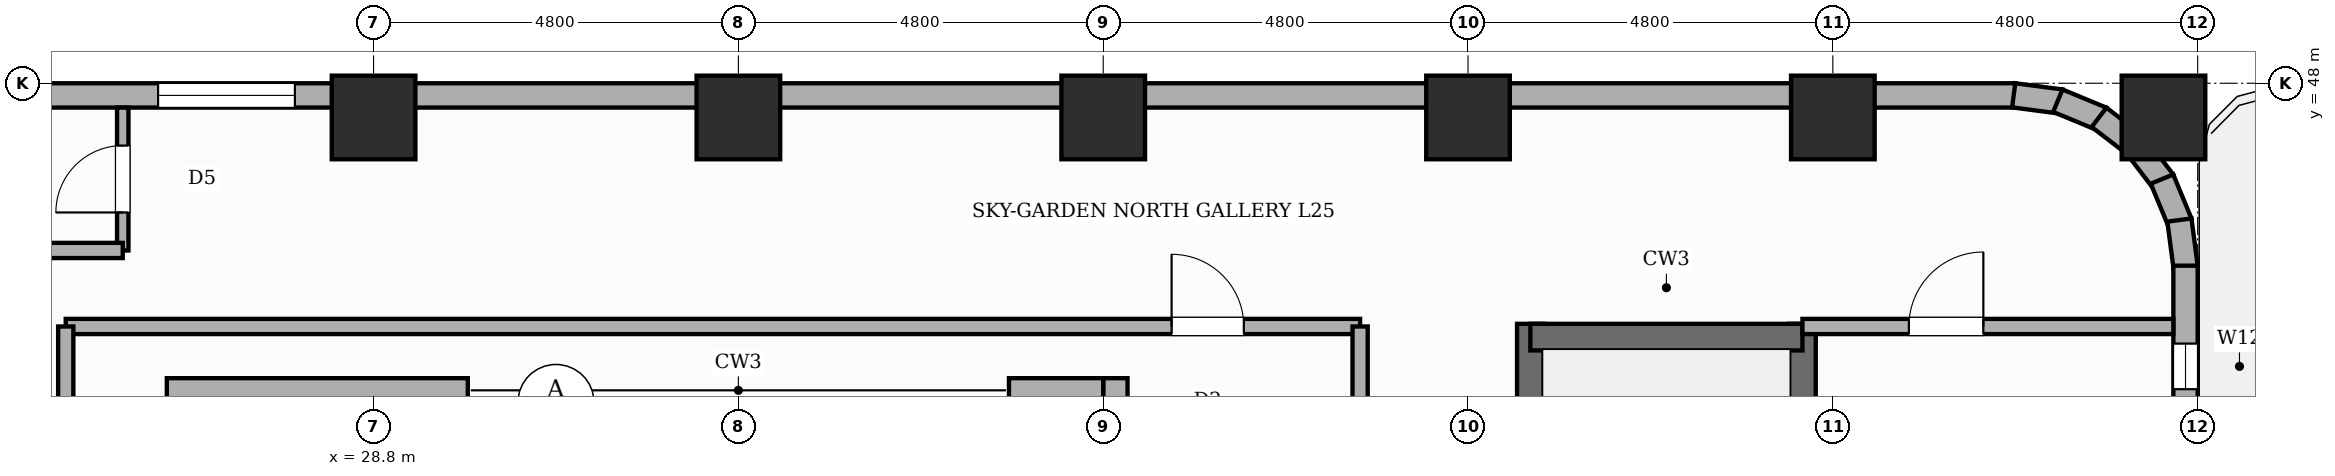
"""IFC4 building model, lengths in metres.
Left out: names, types, materials, properties, quantities, classifications, styles, units other than length and angle.
Written with IfcOpenShell. Run it as: python <this file> out.ifc"""

import sys

from ifc_helpers import new_model, si_unit, direction, frame, frame_2d, origin, origin_2d, place, context, subcontext, project, spatial, rectangle, extrude, element, fill, save


model = new_model("IFC4")
c1 = context("Model", 3, precision=1e-05, world=origin(), true_north=direction((0.0, 1.0)))
c2 = subcontext(c1, "Body", "Model", "MODEL_VIEW")
j1 = project(units=[si_unit("LENGTHUNIT", "METRE"), si_unit("PLANEANGLEUNIT", "RADIAN")], contexts=[c1])
p1 = place(None, origin())
s1 = spatial("IfcSite", under=j1, at=p1, CompositionType="ELEMENT")
p2 = place(p1, origin())
s2 = spatial("IfcBuilding", under=s1, at=p2, CompositionType="ELEMENT")
p3 = place(p2, frame((0.0, 0.0, 97.0)))
s3 = spatial("IfcBuildingStorey", under=s2, at=p3, CompositionType="ELEMENT", Elevation=97.0)
p4 = place(p3, frame((44.02, 35.865, 0.0), z_axis=(0.0, 0.0, 1.0), x_axis=(0.0, 1.0, 0.0)))
e1 = element("IfcWall", 1, at=p4, inside=s3, PredefinedType="SHEAR", context=c2, shape_type="SweptSolid", body=[
    extrude(rectangle(XDim=8.97, YDim=0.35, at=frame_2d((4.485, 0.0))), origin(), (0.0, 0.0, 1.0), 4.8),
])
p5 = place(p4, frame((0.65, 0.0, 0.0)))
e2 = element("IfcOpeningElement", 2, at=p5, cuts=e1, PredefinedType="OPENING", context=c2, shape_type="SweptSolid", body=[
    extrude(rectangle(XDim=0.95, YDim=2.1, at=frame_2d((0.475, 1.05))), frame((0.0, 0.185, 0.0), z_axis=(0.0, -1.0, 0.0), x_axis=(1.0, 0.0, 0.0)), (0.0, 0.0, 1.0), 0.37),
])
p6 = place(p3, frame((47.6, 35.865, 0.0), z_axis=(0.0, 0.0, 1.0), x_axis=(0.0, 1.0, 0.0)))
e3 = element("IfcWall", 3, at=p6, inside=s3, PredefinedType="SHEAR", context=c2, shape_type="SweptSolid", body=[
    extrude(rectangle(XDim=8.97, YDim=0.35, at=frame_2d((4.485, 0.0))), origin(), (0.0, 0.0, 1.0), 4.8),
])
p7 = place(p3, frame((44.02, 44.66, 0.0), z_axis=(0.0, 0.0, 1.0), x_axis=(1.0, 0.0, 0.0)))
e4 = element("IfcWall", 4, at=p7, inside=s3, PredefinedType="SHEAR", context=c2, shape_type="SweptSolid", body=[
    extrude(rectangle(XDim=3.58, YDim=0.35, at=frame_2d((1.79, 0.0))), origin(), (0.0, 0.0, 1.0), 4.8),
])
for number, where, z_axis, x_axis in (
    (5, (28.8, 47.55, 0.0), (0.0, 0.0, 1.0), (1.0, 0.0, 0.0)),
    (6, (33.6, 47.55, 0.0), (0.0, 0.0, 1.0), (1.0, 0.0, 0.0)),
    (7, (38.4, 47.55, 0.0), (0.0, 0.0, 1.0), (1.0, 0.0, 0.0)),
    (8, (43.2, 47.55, 0.0), (0.0, 0.0, 1.0), (1.0, 0.0, 0.0)),
    (9, (48.0, 47.55, 0.0), (0.0, 0.0, 1.0), (1.0, 0.0, 0.0)),
    (10, (52.35, 47.55, 0.0), (0.0, 0.0, 1.0), (1.0, 0.0, 0.0)),
):
    element("IfcColumn", number, at=place(p3, frame(where, z_axis=z_axis, x_axis=x_axis)), inside=s3, PredefinedType="COLUMN", context=c2, shape_type="SweptSolid", body=[
        extrude(rectangle(XDim=1.1, YDim=1.1, at=origin_2d()), origin(), (0.0, 0.0, 1.0), 4.8),
    ])
p8 = place(p3, frame((7.2, 47.84, 0.0), z_axis=(0.0, 0.0, 1.0), x_axis=(1.0, 0.0, 0.0)))
e11 = element("IfcWall", 11, at=p8, inside=s3, PredefinedType="STANDARD", context=c2, shape_type="SweptSolid", body=[
    extrude(rectangle(XDim=43.2, YDim=0.32, at=frame_2d((21.6, 0.0))), origin(), (0.0, 0.0, 1.0), 3.68),
])
p9 = place(p8, frame((18.765, 0.0, 0.8)))
e12 = element("IfcOpeningElement", 12, at=p9, cuts=e11, PredefinedType="OPENING", context=c2, shape_type="SweptSolid", body=[
    extrude(rectangle(XDim=1.8, YDim=2.1, at=frame_2d((0.9, 1.05))), frame((0.0, 0.17, 0.0), z_axis=(0.0, -1.0, 0.0), x_axis=(1.0, 0.0, 0.0)), (0.0, 0.0, 1.0), 0.34),
])
p10 = place(p8, frame((0.345, 0.0, 0.8)))
e13 = element("IfcOpeningElement", 13, at=p10, cuts=e11, PredefinedType="OPENING", context=c2, shape_type="SweptSolid", body=[
    extrude(rectangle(XDim=1.2, YDim=1.8, at=frame_2d((0.6, 0.9))), frame((0.0, 0.17, 0.0), z_axis=(0.0, -1.0, 0.0), x_axis=(1.0, 0.0, 0.0)), (0.0, 0.0, 1.0), 0.34),
])
p11 = place(p8, frame((9.685, 0.0, 0.8)))
e14 = element("IfcOpeningElement", 14, at=p11, cuts=e11, PredefinedType="OPENING", context=c2, shape_type="SweptSolid", body=[
    extrude(rectangle(XDim=1.5, YDim=2.1, at=frame_2d((0.75, 1.05))), frame((0.0, 0.17, 0.0), z_axis=(0.0, -1.0, 0.0), x_axis=(1.0, 0.0, 0.0)), (0.0, 0.0, 1.0), 0.34),
])
for number, where, z_axis, x_axis in (
    (15, (50.379, 47.841, 0.0), (0.0, 0.0, 1.0), (0.991, -0.131, 0.0)),
    (16, (50.96, 47.771, 0.0), (0.0, 0.0, 1.0), (0.924, -0.383, 0.0)),
    (17, (51.503, 47.552, 0.0), (0.0, 0.0, 1.0), (0.793, -0.609, 0.0)),
    (18, (51.97, 47.2, 0.0), (0.0, 0.0, 1.0), (0.609, -0.793, 0.0)),
    (19, (52.331, 46.739, 0.0), (0.0, 0.0, 1.0), (0.382, -0.924, 0.0)),
    (20, (52.56, 46.2, 0.0), (0.0, 0.0, 1.0), (0.131, -0.991, 0.0)),
):
    element("IfcWall", number, at=place(p3, frame(where, z_axis=z_axis, x_axis=x_axis)), inside=s3, PredefinedType="STANDARD", context=c2, shape_type="SweptSolid", body=[
        extrude(rectangle(XDim=0.626, YDim=0.32, at=frame_2d((0.313, 0.0))), origin(), (0.0, 0.0, 1.0), 3.68),
    ])
p12 = place(p3, frame((52.64, 45.6, 0.0), z_axis=(0.0, 0.0, 1.0), x_axis=(0.0, -1.0, 0.0)))
e21 = element("IfcWall", 21, at=p12, inside=s3, PredefinedType="STANDARD", context=c2, shape_type="SweptSolid", body=[
    extrude(rectangle(XDim=14.4, YDim=0.32, at=frame_2d((7.2, 0.0))), origin(), (0.0, 0.0, 1.0), 3.68),
])
p13 = place(p12, frame((8.95, 0.0, 0.0)))
e22 = element("IfcOpeningElement", 22, at=p13, cuts=e21, PredefinedType="OPENING", context=c2, shape_type="SweptSolid", body=[
    extrude(rectangle(XDim=1.3, YDim=2.2, at=frame_2d((0.65, 1.1))), frame((0.0, 0.17, 0.0), z_axis=(0.0, -1.0, 0.0), x_axis=(1.0, 0.0, 0.0)), (0.0, 0.0, 1.0), 0.34),
])
p14 = place(p12, frame((1.025, 0.0, 0.45)))
e23 = element("IfcOpeningElement", 23, at=p14, cuts=e21, PredefinedType="OPENING", context=c2, shape_type="SweptSolid", body=[
    extrude(rectangle(XDim=0.6, YDim=1.8, at=frame_2d((0.3, 0.9))), frame((0.0, 0.17, 0.0), z_axis=(0.0, -1.0, 0.0), x_axis=(1.0, 0.0, 0.0)), (0.0, 0.0, 1.0), 0.34),
])
p15 = place(p3, frame((38.56, 28.8, 0.0), z_axis=(0.0, 0.0, 1.0), x_axis=(0.0, 1.0, 0.0)))
e24 = element("IfcWall", 24, at=p15, inside=s3, PredefinedType="STANDARD", context=c2, shape_type="SweptSolid", body=[
    extrude(rectangle(XDim=15.32, YDim=0.32, at=frame_2d((7.66, 0.0))), origin(), (0.0, 0.0, 1.0), 4.5),
])
p16 = place(p15, frame((6.84, 0.0, 0.8)))
e25 = element("IfcOpeningElement", 25, at=p16, cuts=e24, PredefinedType="OPENING", context=c2, shape_type="SweptSolid", body=[
    extrude(rectangle(XDim=1.8, YDim=2.1, at=frame_2d((0.9, 1.05))), frame((0.0, 0.17, 0.0), z_axis=(0.0, -1.0, 0.0), x_axis=(1.0, 0.0, 0.0)), (0.0, 0.0, 1.0), 0.34),
])
p17 = place(p3, frame((38.4, 43.96, 0.0), z_axis=(0.0, 0.0, 1.0), x_axis=(-1.0, 0.0, 0.0)))
e26 = element("IfcWall", 26, at=p17, inside=s3, PredefinedType="STANDARD", context=c2, shape_type="SweptSolid", body=[
    extrude(rectangle(XDim=1.24, YDim=0.32, at=frame_2d((0.62, 0.0))), origin(), (0.0, 0.0, 1.0), 4.5),
])
p18 = place(p3, frame((30.04, 43.96, 0.0), z_axis=(0.0, 0.0, 1.0), x_axis=(-1.0, 0.0, 0.0)))
e27 = element("IfcWall", 27, at=p18, inside=s3, PredefinedType="STANDARD", context=c2, shape_type="SweptSolid", body=[
    extrude(rectangle(XDim=3.96, YDim=0.32, at=frame_2d((1.98, 0.0))), origin(), (0.0, 0.0, 1.0), 4.5),
])
p19 = place(p3, frame((25.5, 45.8, 0.0), z_axis=(0.0, 0.0, 1.0), x_axis=(0.0, 1.0, 0.0)))
e28 = element("IfcWall", 28, at=p19, inside=s3, PredefinedType="PARTITIONING", context=c2, shape_type="SweptSolid", body=[
    extrude(rectangle(XDim=1.88, YDim=0.15, at=frame_2d((0.94, 0.0))), origin(), (0.0, 0.0, 1.0), 4.5),
])
p20 = place(p19, frame((0.5, 0.0, 0.0)))
e29 = element("IfcOpeningElement", 29, at=p20, cuts=e28, PredefinedType="OPENING", context=c2, shape_type="SweptSolid", body=[
    extrude(rectangle(XDim=0.88, YDim=2.1, at=frame_2d((0.44, 1.05))), frame((0.0, 0.085, 0.0), z_axis=(0.0, -1.0, 0.0), x_axis=(1.0, 0.0, 0.0)), (0.0, 0.0, 1.0), 0.17),
])
p21 = place(p3, frame((22.75, 45.8, 0.0), z_axis=(0.0, 0.0, 1.0), x_axis=(1.0, 0.0, 0.0)))
e30 = element("IfcWall", 30, at=p21, inside=s3, PredefinedType="PARTITIONING", context=c2, shape_type="SweptSolid", body=[
    extrude(rectangle(XDim=2.75, YDim=0.2, at=frame_2d((1.375, 0.0))), origin(), (0.0, 0.0, 1.0), 4.5),
])
p22 = place(p3, frame((24.75, 44.8, 0.0), z_axis=(0.0, 0.0, 1.0), x_axis=(1.0, 0.0, 0.0)))
e31 = element("IfcWall", 31, at=p22, inside=s3, PredefinedType="PARTITIONING", context=c2, shape_type="SweptSolid", body=[
    extrude(rectangle(XDim=17.03, YDim=0.2, at=frame_2d((8.515, 0.0))), origin(), (0.0, 0.0, 1.0), 4.5),
])
p23 = place(p22, frame((14.55, 0.0, 0.0)))
e32 = element("IfcOpeningElement", 32, at=p23, cuts=e31, PredefinedType="OPENING", context=c2, shape_type="SweptSolid", body=[
    extrude(rectangle(XDim=0.95, YDim=2.15, at=frame_2d((0.475, 1.075))), frame((0.0, 0.11, 0.0), z_axis=(0.0, -1.0, 0.0), x_axis=(1.0, 0.0, 0.0)), (0.0, 0.0, 1.0), 0.22),
])
p24 = place(p3, frame((47.6, 44.8, 0.0), z_axis=(0.0, 0.0, 1.0), x_axis=(1.0, 0.0, 0.0)))
e33 = element("IfcWall", 33, at=p24, inside=s3, PredefinedType="PARTITIONING", context=c2, shape_type="SweptSolid", body=[
    extrude(rectangle(XDim=4.88, YDim=0.2, at=frame_2d((2.44, 0.0))), origin(), (0.0, 0.0, 1.0), 4.5),
])
p25 = place(p24, frame((1.4, 0.0, 0.0)))
e34 = element("IfcOpeningElement", 34, at=p25, cuts=e33, PredefinedType="OPENING", context=c2, shape_type="SweptSolid", body=[
    extrude(rectangle(XDim=0.98, YDim=2.18, at=frame_2d((0.49, 1.09))), frame((0.0, 0.11, 0.0), z_axis=(0.0, -1.0, 0.0), x_axis=(1.0, 0.0, 0.0)), (0.0, 0.0, 1.0), 0.22),
])
p26 = place(p3, frame((24.75, 40.6, 0.0), z_axis=(0.0, 0.0, 1.0), x_axis=(0.0, 1.0, 0.0)))
e35 = element("IfcWall", 35, at=p26, inside=s3, PredefinedType="PARTITIONING", context=c2, shape_type="SweptSolid", body=[
    extrude(rectangle(XDim=4.2, YDim=0.2, at=frame_2d((2.1, 0.0))), origin(), (0.0, 0.0, 1.0), 4.5),
])
p27 = place(p26, frame((0.85, 0.0, 0.0)))
e36 = element("IfcOpeningElement", 36, at=p27, cuts=e35, PredefinedType="OPENING", context=c2, shape_type="SweptSolid", body=[
    extrude(rectangle(XDim=0.88, YDim=2.1, at=frame_2d((0.44, 1.05))), frame((0.0, 0.11, 0.0), z_axis=(0.0, -1.0, 0.0), x_axis=(1.0, 0.0, 0.0)), (0.0, 0.0, 1.0), 0.22),
])
p28 = place(p3, frame((41.78, 36.05, 0.0), z_axis=(0.0, 0.0, 1.0), x_axis=(0.0, 1.0, 0.0)))
e37 = element("IfcWall", 37, at=p28, inside=s3, PredefinedType="PARTITIONING", context=c2, shape_type="SweptSolid", body=[
    extrude(rectangle(XDim=8.75, YDim=0.2, at=frame_2d((4.375, 0.0))), origin(), (0.0, 0.0, 1.0), 4.5),
])
p29 = place(p9, origin())
e38 = element("IfcWindow", 38, at=p29, inside=s3, PartitioningType="SINGLE_PANEL", PredefinedType="WINDOW", context=c2, shape_type="SweptSolid", body=[
    extrude(rectangle(XDim=1.8, YDim=2.1, at=frame_2d((0.9, 1.05))), frame((0.0, 0.03, 0.0), z_axis=(0.0, -1.0, 0.0), x_axis=(1.0, 0.0, 0.0)), (0.0, 0.0, 1.0), 0.06),
])
fill(e12, e38)
p30 = place(p14, origin())
e39 = element("IfcWindow", 39, at=p30, inside=s3, PartitioningType="SINGLE_PANEL", PredefinedType="WINDOW", context=c2, shape_type="SweptSolid", body=[
    extrude(rectangle(XDim=0.6, YDim=1.8, at=frame_2d((0.3, 0.9))), frame((0.0, 0.03, 0.0), z_axis=(0.0, -1.0, 0.0), x_axis=(1.0, 0.0, 0.0)), (0.0, 0.0, 1.0), 0.06),
])
fill(e23, e39)
p31 = place(p20, origin())
e40 = element("IfcDoor", 40, at=p31, inside=s3, OperationType="SINGLE_SWING_LEFT", PredefinedType="DOOR", context=c2, shape_type="SweptSolid", body=[
    extrude(rectangle(XDim=0.88, YDim=2.1, at=frame_2d((0.44, 1.05))), frame((0.0, 0.025, 0.0), z_axis=(0.0, -1.0, 0.0), x_axis=(1.0, 0.0, 0.0)), (0.0, 0.0, 1.0), 0.05),
])
fill(e29, e40)
p32 = place(p23, origin())
e41 = element("IfcDoor", 41, at=p32, inside=s3, OperationType="SINGLE_SWING_LEFT", PredefinedType="DOOR", context=c2, shape_type="SweptSolid", body=[
    extrude(rectangle(XDim=0.95, YDim=2.15, at=frame_2d((0.475, 1.075))), frame((0.0, 0.025, 0.0), z_axis=(0.0, -1.0, 0.0), x_axis=(1.0, 0.0, 0.0)), (0.0, 0.0, 1.0), 0.05),
])
fill(e32, e41)
p33 = place(p25, origin())
e42 = element("IfcDoor", 42, at=p33, inside=s3, OperationType="SINGLE_SWING_RIGHT", PredefinedType="DOOR", context=c2, shape_type="SweptSolid", body=[
    extrude(rectangle(XDim=0.98, YDim=2.18, at=frame_2d((0.49, 1.09))), frame((0.0, 0.025, 0.0), z_axis=(0.0, -1.0, 0.0), x_axis=(1.0, 0.0, 0.0)), (0.0, 0.0, 1.0), 0.05),
])
fill(e34, e42)
save(model, sys.argv[1])
